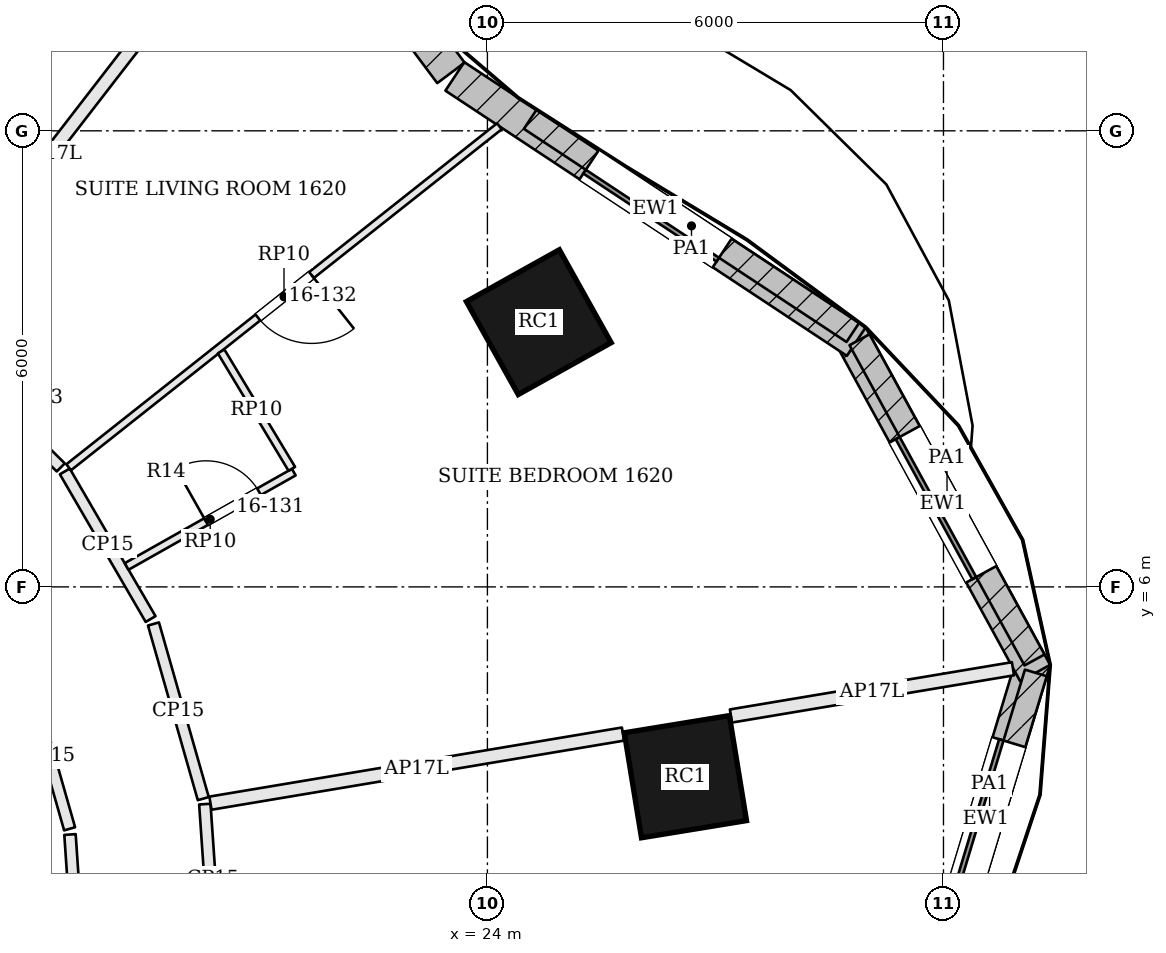
"""IFC4 building model, lengths in metres.
Left out: names, types, materials, properties, quantities, classifications, styles, units other than length and angle.
Written with IfcOpenShell. Run it as: python <this file> out.ifc"""

import sys

from ifc_helpers import new_model, si_unit, direction, frame, frame_2d, origin, origin_2d, place, context, subcontext, project, spatial, rectangle, extrude, element, fill, save


model = new_model("IFC4")
c1 = context("Model", 3, precision=1e-05, world=origin(), true_north=direction((0.0, 1.0)))
c2 = subcontext(c1, "Body", "Model", "MODEL_VIEW")
j1 = project(units=[si_unit("LENGTHUNIT", "METRE"), si_unit("PLANEANGLEUNIT", "RADIAN")], contexts=[c1])
p1 = place(None, origin())
s1 = spatial("IfcSite", under=j1, at=p1, CompositionType="ELEMENT")
p2 = place(p1, origin())
s2 = spatial("IfcBuilding", under=s1, at=p2, CompositionType="ELEMENT")
p3 = place(p2, frame((0.0, 0.0, 73.5)))
s3 = spatial("IfcBuildingStorey", under=s2, at=p3, CompositionType="ELEMENT", Elevation=73.5)
for number, where, z_axis, x_axis in (
    (1, (26.605, 3.503, 0.0), (0.0, 0.0, 1.0), (-0.161, 0.987, 0.0)),
    (2, (24.676, 9.483, 0.0), (0.0, 0.0, 1.0), (-0.487, 0.873, 0.0)),
):
    element("IfcColumn", number, at=place(p3, frame(where, z_axis=z_axis, x_axis=x_axis)), inside=s3, PredefinedType="COLUMN", context=c2, shape_type="SweptSolid", body=[
        extrude(rectangle(XDim=1.4, YDim=1.4, at=origin_2d()), origin(), (0.0, 0.0, 1.0), 2.8),
    ])
p4 = place(p3, frame((29.927, 0.865, 0.0), z_axis=(0.0, 0.0, 1.0), x_axis=(0.289432445378, 0.957198443147, 0.0)))
e3 = element("IfcWall", 3, at=p4, inside=s3, PredefinedType="SOLIDWALL", context=c2, shape_type="SweptSolid", body=[
    extrude(rectangle(XDim=4.361, YDim=0.45, at=frame_2d((2.181, 0.0))), origin(), (0.0, 0.0, 1.0), 3.3),
])
p5 = place(p4, frame((1.131, 0.0, 0.9)))
e4 = element("IfcOpeningElement", 4, at=p5, cuts=e3, PredefinedType="OPENING", context=c2, shape_type="SweptSolid", body=[
    extrude(rectangle(XDim=2.1, YDim=1.8, at=frame_2d((1.05, 0.9))), frame((0.0, 0.235, 0.0), z_axis=(0.0, -1.0, 0.0), x_axis=(1.0, 0.0, 0.0)), (0.0, 0.0, 1.0), 0.47),
])
p6 = place(p3, frame((31.207, 4.866, 0.0), z_axis=(0.0, 0.0, 1.0), x_axis=(-0.479565142605, 0.877506281458, 0.0)))
e5 = element("IfcWall", 5, at=p6, inside=s3, PredefinedType="SOLIDWALL", context=c2, shape_type="SweptSolid", body=[
    extrude(rectangle(XDim=5.061, YDim=0.45, at=frame_2d((2.53, 0.0))), origin(), (0.0, 0.0, 1.0), 3.3),
])
p7 = place(p6, frame((1.48, 0.0, 0.9)))
e6 = element("IfcOpeningElement", 6, at=p7, cuts=e5, PredefinedType="OPENING", context=c2, shape_type="SweptSolid", body=[
    extrude(rectangle(XDim=2.1, YDim=1.8, at=frame_2d((1.05, 0.9))), frame((0.0, 0.235, 0.0), z_axis=(0.0, -1.0, 0.0), x_axis=(1.0, 0.0, 0.0)), (0.0, 0.0, 1.0), 0.47),
])
p8 = place(p3, frame((28.853, 9.227, 0.0), z_axis=(0.0, 0.0, 1.0), x_axis=(-0.834404370393, 0.551152743502, 0.0)))
e7 = element("IfcWall", 7, at=p8, inside=s3, PredefinedType="SOLIDWALL", context=c2, shape_type="SweptSolid", body=[
    extrude(rectangle(XDim=6.33, YDim=0.45, at=frame_2d((3.165, 0.0))), origin(), (0.0, 0.0, 1.0), 3.3),
])
p9 = place(p8, frame((2.115, 0.0, 0.9)))
e8 = element("IfcOpeningElement", 8, at=p9, cuts=e7, PredefinedType="OPENING", context=c2, shape_type="SweptSolid", body=[
    extrude(rectangle(XDim=2.1, YDim=1.8, at=frame_2d((1.05, 0.9))), frame((0.0, 0.235, 0.0), z_axis=(0.0, -1.0, 0.0), x_axis=(1.0, 0.0, 0.0)), (0.0, 0.0, 1.0), 0.47),
])
p10 = place(p3, frame((23.52, 12.762, 0.0), z_axis=(0.0, 0.0, 1.0), x_axis=(-0.598664281495, 0.801000048728, 0.0)))
e9 = element("IfcWall", 9, at=p10, inside=s3, PredefinedType="SOLIDWALL", context=c2, shape_type="SweptSolid", body=[
    extrude(rectangle(XDim=3.482, YDim=0.45, at=frame_2d((1.741, 0.0))), origin(), (0.0, 0.0, 1.0), 3.3),
])
p11 = place(p10, frame((0.691, 0.0, 0.9)))
e10 = element("IfcOpeningElement", 10, at=p11, cuts=e9, PredefinedType="OPENING", context=c2, shape_type="SweptSolid", body=[
    extrude(rectangle(XDim=2.1, YDim=1.8, at=frame_2d((1.05, 0.9))), frame((0.0, 0.235, 0.0), z_axis=(0.0, -1.0, 0.0), x_axis=(1.0, 0.0, 0.0)), (0.0, 0.0, 1.0), 0.47),
])
p12 = place(p3, frame((29.998, 0.843, 3.6), z_axis=(0.0, 0.0, 1.0), x_axis=(0.289403108737, 0.95720731331, 0.0)))
e11 = element("IfcWall", 11, at=p12, inside=s3, PredefinedType="PARAPET", context=c2, shape_type="SweptSolid", body=[
    extrude(rectangle(XDim=4.205, YDim=0.3, at=frame_2d((2.103, 0.0))), origin(), (0.0, 0.0, 1.0), 1.1),
])
p13 = place(p3, frame((31.198, 5.039, 3.6), z_axis=(0.0, 0.0, 1.0), x_axis=(-0.479564593641, 0.877506581472, 0.0)))
e12 = element("IfcWall", 12, at=p13, inside=s3, PredefinedType="PARAPET", context=c2, shape_type="SweptSolid", body=[
    extrude(rectangle(XDim=4.801, YDim=0.3, at=frame_2d((2.4, 0.0))), origin(), (0.0, 0.0, 1.0), 1.1),
])
p14 = place(p3, frame((28.807, 9.347, 3.6), z_axis=(0.0, 0.0, 1.0), x_axis=(-0.834390896723, 0.551173141097, 0.0)))
e13 = element("IfcWall", 13, at=p14, inside=s3, PredefinedType="PARAPET", context=c2, shape_type="SweptSolid", body=[
    extrude(rectangle(XDim=5.087, YDim=0.3, at=frame_2d((2.543, 0.0))), origin(), (0.0, 0.0, 1.0), 1.1),
])
p15 = place(p3, frame((20.493, 0.075, 0.0), z_axis=(0.0, 0.0, 1.0), x_axis=(-0.068600445792, 0.997644214556, 0.0)))
e14 = element("IfcWall", 14, at=p15, inside=s3, PredefinedType="PARTITIONING", context=c2, shape_type="SweptSolid", body=[
    extrude(rectangle(XDim=3.075, YDim=0.15, at=frame_2d((1.538, 0.0))), origin(), (0.0, 0.0, 1.0), 2.684),
])
p16 = place(p15, frame((1.055, 0.0, 0.0)))
e15 = element("IfcOpeningElement", 15, at=p16, cuts=e14, PredefinedType="OPENING", context=c2, shape_type="SweptSolid", body=[
    extrude(rectangle(XDim=1.0, YDim=2.1, at=frame_2d((0.5, 1.05))), frame((0.0, 0.085, 0.0), z_axis=(0.0, -1.0, 0.0), x_axis=(1.0, 0.0, 0.0)), (0.0, 0.0, 1.0), 0.17),
])
p17 = place(p3, frame((30.914, 4.923, 0.0), z_axis=(0.0, 0.0, 1.0), x_axis=(-0.986255007441, -0.165230324995, 0.0)))
e16 = element("IfcWall", 16, at=p17, inside=s3, PredefinedType="PARTITIONING", context=c2, shape_type="SweptSolid", body=[
    extrude(rectangle(XDim=3.762, YDim=0.175, at=frame_2d((1.881, 0.0))), origin(), (0.0, 0.0, 1.0), 2.28),
])
p18 = place(p3, frame((25.784, 4.064, 0.0), z_axis=(0.0, 0.0, 1.0), x_axis=(-0.986264115996, -0.165175947092, 0.0)))
e17 = element("IfcWall", 17, at=p18, inside=s3, PredefinedType="PARTITIONING", context=c2, shape_type="SweptSolid", body=[
    extrude(rectangle(XDim=5.503, YDim=0.175, at=frame_2d((2.751, 0.0))), origin(), (0.0, 0.0, 1.0), 2.28),
])
p19 = place(p3, frame((20.262, 3.214, 0.0), z_axis=(0.0, 0.0, 1.0), x_axis=(-0.274235283905, 0.961662627464, 0.0)))
e18 = element("IfcWall", 18, at=p19, inside=s3, PredefinedType="PARTITIONING", context=c2, shape_type="SweptSolid", body=[
    extrude(rectangle(XDim=2.389, YDim=0.15, at=frame_2d((1.195, 0.0))), origin(), (0.0, 0.0, 1.0), 2.684),
])
p20 = place(p3, frame((19.569, 5.577, 0.0), z_axis=(0.0, 0.0, 1.0), x_axis=(-0.502457989762, 0.864601624174, 0.0)))
e19 = element("IfcWall", 19, at=p20, inside=s3, PredefinedType="PARTITIONING", context=c2, shape_type="SweptSolid", body=[
    extrude(rectangle(XDim=2.246, YDim=0.15, at=frame_2d((1.123, 0.0))), origin(), (0.0, 0.0, 1.0), 2.684),
])
p21 = place(p3, frame((18.387, 7.572, 0.0), z_axis=(0.0, 0.0, 1.0), x_axis=(-0.710044986999, 0.704156315343, 0.0)))
e20 = element("IfcWall", 20, at=p21, inside=s3, PredefinedType="PARTITIONING", context=c2, shape_type="SweptSolid", body=[
    extrude(rectangle(XDim=2.653, YDim=0.15, at=frame_2d((1.327, 0.0))), origin(), (0.0, 0.0, 1.0), 2.684),
])
p22 = place(p21, frame((0.797, 0.0, 0.0)))
e21 = element("IfcOpeningElement", 21, at=p22, cuts=e20, PredefinedType="OPENING", context=c2, shape_type="SweptSolid", body=[
    extrude(rectangle(XDim=1.0, YDim=2.1, at=frame_2d((0.5, 1.05))), frame((0.0, 0.085, 0.0), z_axis=(0.0, -1.0, 0.0), x_axis=(1.0, 0.0, 0.0)), (0.0, 0.0, 1.0), 0.17),
])
p23 = place(p3, frame((19.936, 13.883, 0.0), z_axis=(0.0, 0.0, 1.0), x_axis=(-0.611383527359, -0.791334431498, 0.0)))
e22 = element("IfcWall", 22, at=p23, inside=s3, PredefinedType="PARTITIONING", context=c2, shape_type="SweptSolid", body=[
    extrude(rectangle(XDim=5.54, YDim=0.175, at=frame_2d((2.77, 0.0))), origin(), (0.0, 0.0, 1.0), 2.28),
])
p24 = place(p3, frame((17.958, 4.73, 0.0), z_axis=(0.0, 0.0, 1.0), x_axis=(0.274315841816, -0.961639651288, 0.0)))
e23 = element("IfcWall", 23, at=p24, inside=s3, PredefinedType="PARTITIONING", context=c2, shape_type="SweptSolid", body=[
    extrude(rectangle(XDim=1.989, YDim=0.15, at=frame_2d((0.995, 0.0))), origin(), (0.0, 0.0, 1.0), 2.684),
])
p25 = place(p3, frame((18.508, 2.742, 0.0), z_axis=(0.0, 0.0, 1.0), x_axis=(0.067774714774, -0.997700650515, 0.0)))
e24 = element("IfcWall", 24, at=p25, inside=s3, PredefinedType="PARTITIONING", context=c2, shape_type="SweptSolid", body=[
    extrude(rectangle(XDim=2.749, YDim=0.15, at=frame_2d((1.374, 0.0))), origin(), (0.0, 0.0, 1.0), 2.684),
])
p26 = place(p3, frame((24.157, 12.06, 0.0), z_axis=(0.0, 0.0, 1.0), x_axis=(-0.784016366574, -0.620740152515, 0.0)))
e25 = element("IfcWall", 25, at=p26, inside=s3, PredefinedType="PARTITIONING", context=c2, shape_type="SweptSolid", body=[
    extrude(rectangle(XDim=7.227, YDim=0.1, at=frame_2d((3.613, 0.0))), origin(), (0.0, 0.0, 1.0), 2.784),
])
p27 = place(p26, frame((3.152, 0.0, 0.0)))
e26 = element("IfcOpeningElement", 26, at=p27, cuts=e25, PredefinedType="OPENING", context=c2, shape_type="SweptSolid", body=[
    extrude(rectangle(XDim=0.9, YDim=2.4, at=frame_2d((0.45, 1.2))), frame((0.0, 0.06, 0.0), z_axis=(0.0, -1.0, 0.0), x_axis=(1.0, 0.0, 0.0)), (0.0, 0.0, 1.0), 0.12),
])
p28 = place(p3, frame((19.253, 6.269, 0.0), z_axis=(0.0, 0.0, 1.0), x_axis=(0.870849008749, 0.4915506118, 0.0)))
e27 = element("IfcWall", 27, at=p28, inside=s3, PredefinedType="PARTITIONING", context=c2, shape_type="SweptSolid", body=[
    extrude(rectangle(XDim=2.525, YDim=0.1, at=frame_2d((1.263, 0.0))), origin(), (0.0, 0.0, 1.0), 2.784),
])
p29 = place(p28, frame((1.2, 0.0, 0.0)))
e28 = element("IfcOpeningElement", 28, at=p29, cuts=e27, PredefinedType="OPENING", context=c2, shape_type="SweptSolid", body=[
    extrude(rectangle(XDim=0.8, YDim=2.1, at=frame_2d((0.4, 1.05))), frame((0.0, 0.06, 0.0), z_axis=(0.0, -1.0, 0.0), x_axis=(1.0, 0.0, 0.0)), (0.0, 0.0, 1.0), 0.12),
])
p30 = place(p3, frame((21.427, 7.553, 0.0), z_axis=(0.0, 0.0, 1.0), x_axis=(-0.515590167939, 0.856835327659, 0.0)))
e29 = element("IfcWall", 29, at=p30, inside=s3, PredefinedType="PARTITIONING", context=c2, shape_type="SweptSolid", body=[
    extrude(rectangle(XDim=1.804, YDim=0.1, at=frame_2d((0.902, 0.0))), origin(), (0.0, 0.0, 1.0), 2.784),
])
p31 = place(p3, frame((19.269, 19.337, 0.0), z_axis=(0.0, 0.0, 1.0), x_axis=(-0.483534175025, -0.875325483225, 0.0)))
e30 = element("IfcWall", 30, at=p31, inside=s3, PredefinedType="PARTITIONING", context=c2, shape_type="SweptSolid", body=[
    extrude(rectangle(XDim=9.168, YDim=0.1, at=frame_2d((4.584, 0.0))), origin(), (0.0, 0.0, 1.0), 2.784),
])
p32 = place(p31, frame((5.093, 0.0, 0.0)))
e31 = element("IfcOpeningElement", 31, at=p32, cuts=e30, PredefinedType="OPENING", context=c2, shape_type="SweptSolid", body=[
    extrude(rectangle(XDim=0.9, YDim=2.4, at=frame_2d((0.45, 1.2))), frame((0.0, 0.06, 0.0), z_axis=(0.0, -1.0, 0.0), x_axis=(1.0, 0.0, 0.0)), (0.0, 0.0, 1.0), 0.12),
])
p33 = place(p5, origin())
e32 = element("IfcWindow", 32, at=p33, inside=s3, PartitioningType="SINGLE_PANEL", PredefinedType="WINDOW", context=c2, shape_type="SweptSolid", body=[
    extrude(rectangle(XDim=2.1, YDim=1.8, at=frame_2d((1.05, 0.9))), frame((0.0, 0.135, 0.0), z_axis=(0.0, -1.0, 0.0), x_axis=(1.0, 0.0, 0.0)), (0.0, 0.0, 1.0), 0.06),
])
fill(e4, e32)
p34 = place(p7, origin())
e33 = element("IfcWindow", 33, at=p34, inside=s3, PartitioningType="SINGLE_PANEL", PredefinedType="WINDOW", context=c2, shape_type="SweptSolid", body=[
    extrude(rectangle(XDim=2.1, YDim=1.8, at=frame_2d((1.05, 0.9))), frame((0.0, 0.135, 0.0), z_axis=(0.0, -1.0, 0.0), x_axis=(1.0, 0.0, 0.0)), (0.0, 0.0, 1.0), 0.06),
])
fill(e6, e33)
p35 = place(p9, origin())
e34 = element("IfcWindow", 34, at=p35, inside=s3, PartitioningType="SINGLE_PANEL", PredefinedType="WINDOW", context=c2, shape_type="SweptSolid", body=[
    extrude(rectangle(XDim=2.1, YDim=1.8, at=frame_2d((1.05, 0.9))), frame((0.0, 0.135, 0.0), z_axis=(0.0, -1.0, 0.0), x_axis=(1.0, 0.0, 0.0)), (0.0, 0.0, 1.0), 0.06),
])
fill(e8, e34)
p36 = place(p29, origin())
e35 = element("IfcDoor", 35, at=p36, inside=s3, OperationType="SINGLE_SWING_LEFT", PredefinedType="DOOR", context=c2, shape_type="SweptSolid", body=[
    extrude(rectangle(XDim=0.8, YDim=2.1, at=frame_2d((0.4, 1.05))), frame((0.0, 0.025, 0.0), z_axis=(0.0, -1.0, 0.0), x_axis=(1.0, 0.0, 0.0)), (0.0, 0.0, 1.0), 0.05),
])
fill(e28, e35)
p37 = place(p27, origin())
e36 = element("IfcDoor", 36, at=p37, inside=s3, OperationType="SINGLE_SWING_LEFT", PredefinedType="DOOR", context=c2, shape_type="SweptSolid", body=[
    extrude(rectangle(XDim=0.9, YDim=2.4, at=frame_2d((0.45, 1.2))), frame((0.0, 0.025, 0.0), z_axis=(0.0, -1.0, 0.0), x_axis=(1.0, 0.0, 0.0)), (0.0, 0.0, 1.0), 0.05),
])
fill(e26, e36)
save(model, sys.argv[1])
